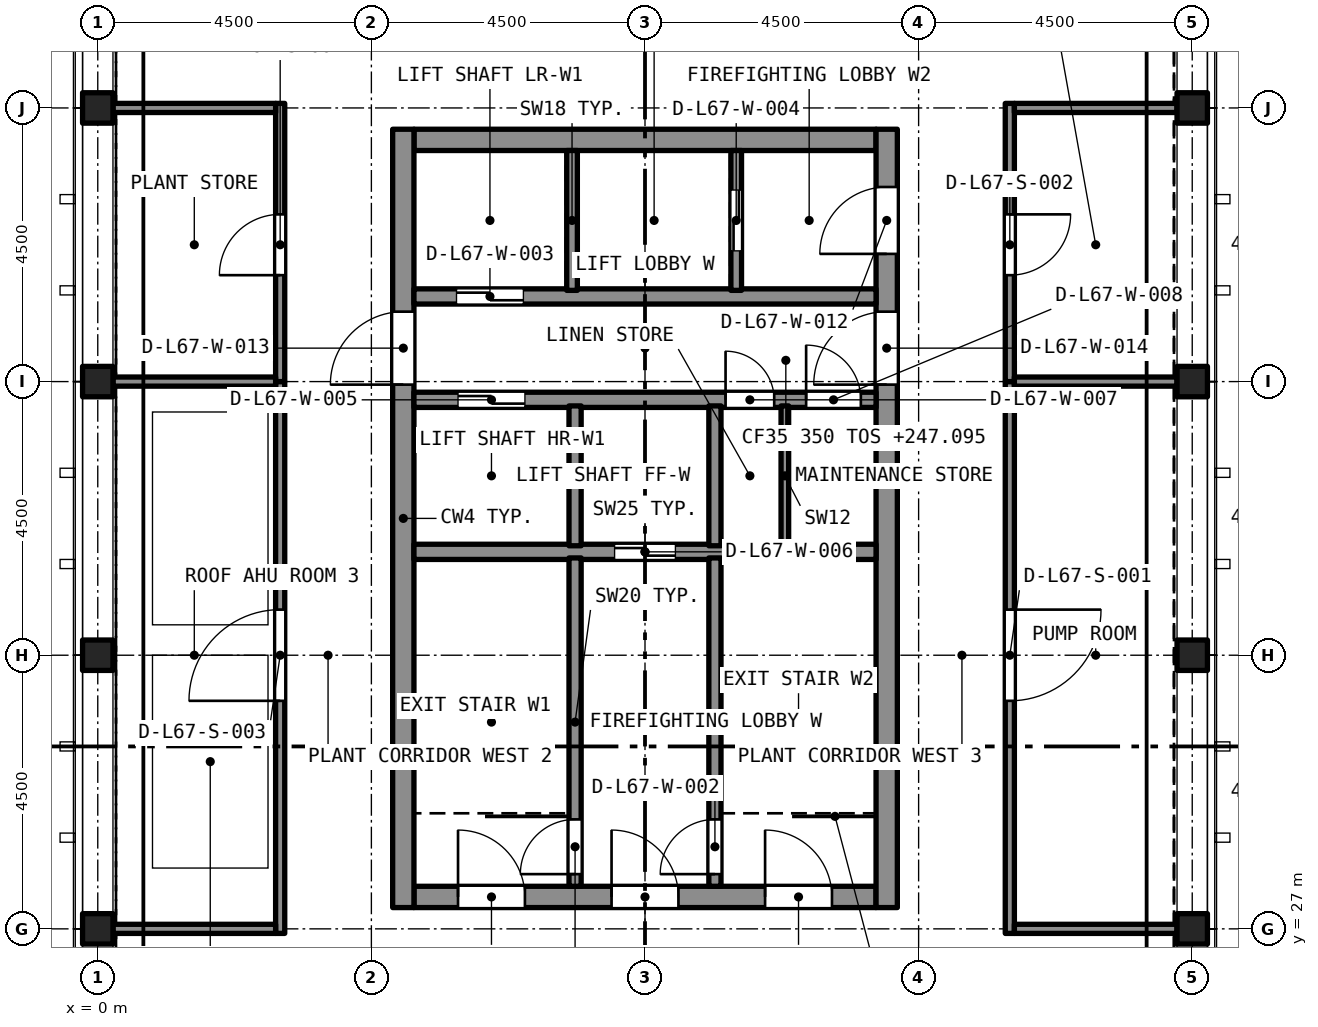
"""IFC4 building model, lengths in metres.
Left out: names, types, materials, properties, quantities, classifications, styles, units other than length and angle.
Written with IfcOpenShell. Run it as: python <this file> out.ifc"""

import sys

from ifc_helpers import new_model, si_unit, direction, frame, frame_2d, origin, origin_2d, place, context, subcontext, project, spatial, rectangle, hollow_rectangle, extrude, element, fill, save


model = new_model("IFC4")
c1 = context("Model", 3, precision=1e-05, world=origin(), true_north=direction((0.0, 1.0)))
c2 = subcontext(c1, "Body", "Model", "MODEL_VIEW")
j1 = project(units=[si_unit("LENGTHUNIT", "METRE"), si_unit("PLANEANGLEUNIT", "RADIAN")], contexts=[c1])
p1 = place(None, origin())
s1 = spatial("IfcSite", under=j1, at=p1, CompositionType="ELEMENT")
p2 = place(p1, origin())
s2 = spatial("IfcBuilding", under=s1, at=p2, CompositionType="ELEMENT")
p3 = place(p2, frame((0.0, 0.0, 247.095)))
s3 = spatial("IfcBuildingStorey", under=s2, at=p3, CompositionType="ELEMENT", Elevation=247.095)
p4 = place(p3, frame((5.2, 27.525, 0.0), z_axis=(0.0, 0.0, 1.0), x_axis=(1.0, 0.0, 0.0)))
e1 = element("IfcWall", 1, at=p4, inside=s3, PredefinedType="SOLIDWALL", context=c2, shape_type="SweptSolid", body=[
    extrude(rectangle(XDim=7.6, YDim=0.35, at=frame_2d((3.8, 0.0))), origin(), (0.0, 0.0, 1.0), 11.4),
])
p5 = place(p4, frame((0.725, 0.0, 0.0)))
e2 = element("IfcOpeningElement", 2, at=p5, cuts=e1, PredefinedType="OPENING", context=c2, shape_type="SweptSolid", body=[
    extrude(rectangle(XDim=1.1, YDim=2.1, at=frame_2d((0.55, 1.05))), frame((0.0, 0.185, 0.0), z_axis=(0.0, -1.0, 0.0), x_axis=(1.0, 0.0, 0.0)), (0.0, 0.0, 1.0), 0.37),
])
p6 = place(p4, frame((3.25, 0.0, 0.0)))
e3 = element("IfcOpeningElement", 3, at=p6, cuts=e1, PredefinedType="OPENING", context=c2, shape_type="SweptSolid", body=[
    extrude(rectangle(XDim=1.1, YDim=2.1, at=frame_2d((0.55, 1.05))), frame((0.0, 0.185, 0.0), z_axis=(0.0, -1.0, 0.0), x_axis=(1.0, 0.0, 0.0)), (0.0, 0.0, 1.0), 0.37),
])
p7 = place(p4, frame((5.775, 0.0, 0.0)))
e4 = element("IfcOpeningElement", 4, at=p7, cuts=e1, PredefinedType="OPENING", context=c2, shape_type="SweptSolid", body=[
    extrude(rectangle(XDim=1.1, YDim=2.1, at=frame_2d((0.55, 1.05))), frame((0.0, 0.185, 0.0), z_axis=(0.0, -1.0, 0.0), x_axis=(1.0, 0.0, 0.0)), (0.0, 0.0, 1.0), 0.37),
])
p8 = place(p3, frame((5.2, 39.975, 0.0), z_axis=(0.0, 0.0, 1.0), x_axis=(1.0, 0.0, 0.0)))
e5 = element("IfcWall", 5, at=p8, inside=s3, PredefinedType="SOLIDWALL", context=c2, shape_type="SweptSolid", body=[
    extrude(rectangle(XDim=7.6, YDim=0.35, at=frame_2d((3.8, 0.0))), origin(), (0.0, 0.0, 1.0), 11.4),
])
p9 = place(p3, frame((5.025, 27.35, 0.0), z_axis=(0.0, 0.0, 1.0), x_axis=(0.0, 1.0, 0.0)))
e6 = element("IfcWall", 6, at=p9, inside=s3, PredefinedType="SOLIDWALL", context=c2, shape_type="SweptSolid", body=[
    extrude(rectangle(XDim=12.8, YDim=0.35, at=frame_2d((6.4, 0.0))), origin(), (0.0, 0.0, 1.0), 11.4),
])
p10 = place(p9, frame((8.6, 0.0, 0.0)))
e7 = element("IfcOpeningElement", 7, at=p10, cuts=e6, PredefinedType="OPENING", context=c2, shape_type="SweptSolid", body=[
    extrude(rectangle(XDim=1.2, YDim=2.1, at=frame_2d((0.6, 1.05))), frame((0.0, 0.185, 0.0), z_axis=(0.0, -1.0, 0.0), x_axis=(1.0, 0.0, 0.0)), (0.0, 0.0, 1.0), 0.37),
])
p11 = place(p3, frame((12.975, 27.35, 0.0), z_axis=(0.0, 0.0, 1.0), x_axis=(0.0, 1.0, 0.0)))
e8 = element("IfcWall", 8, at=p11, inside=s3, PredefinedType="SOLIDWALL", context=c2, shape_type="SweptSolid", body=[
    extrude(rectangle(XDim=12.8, YDim=0.35, at=frame_2d((6.4, 0.0))), origin(), (0.0, 0.0, 1.0), 11.4),
])
p12 = place(p11, frame((10.75, 0.0, 0.0)))
e9 = element("IfcOpeningElement", 9, at=p12, cuts=e8, PredefinedType="OPENING", context=c2, shape_type="SweptSolid", body=[
    extrude(rectangle(XDim=1.1, YDim=2.1, at=frame_2d((0.55, 1.05))), frame((0.0, 0.185, 0.0), z_axis=(0.0, -1.0, 0.0), x_axis=(1.0, 0.0, 0.0)), (0.0, 0.0, 1.0), 0.37),
])
p13 = place(p11, frame((8.6, 0.0, 0.0)))
e10 = element("IfcOpeningElement", 10, at=p13, cuts=e8, PredefinedType="OPENING", context=c2, shape_type="SweptSolid", body=[
    extrude(rectangle(XDim=1.2, YDim=2.1, at=frame_2d((0.6, 1.05))), frame((0.0, 0.185, 0.0), z_axis=(0.0, -1.0, 0.0), x_axis=(1.0, 0.0, 0.0)), (0.0, 0.0, 1.0), 0.37),
])
for number, where, z_axis, x_axis in (
    (11, (0.0, 27.0, 0.0), (0.0, 0.0, 1.0), (1.0, 0.0, 0.0)),
    (12, (18.0, 27.0, 0.0), (0.0, 0.0, 1.0), (1.0, 0.0, 0.0)),
    (13, (0.0, 31.5, 0.0), (0.0, 0.0, 1.0), (1.0, 0.0, 0.0)),
    (14, (18.0, 31.5, 0.0), (0.0, 0.0, 1.0), (1.0, 0.0, 0.0)),
    (15, (0.0, 36.0, 0.0), (0.0, 0.0, 1.0), (1.0, 0.0, 0.0)),
    (16, (18.0, 36.0, 0.0), (0.0, 0.0, 1.0), (1.0, 0.0, 0.0)),
    (17, (0.0, 40.5, 0.0), (0.0, 0.0, 1.0), (1.0, 0.0, 0.0)),
    (18, (18.0, 40.5, 0.0), (0.0, 0.0, 1.0), (1.0, 0.0, 0.0)),
):
    element("IfcColumn", number, at=place(p3, frame(where, z_axis=z_axis, x_axis=x_axis)), inside=s3, PredefinedType="COLUMN", context=c2, shape_type="SweptSolid", body=[
        extrude(hollow_rectangle(XDim=0.5, YDim=0.5, WallThickness=0.025, at=origin_2d()), origin(), (0.0, 0.0, 1.0), 11.37),
    ])
p14 = place(p3, frame((5.2, 33.2, 0.0), z_axis=(0.0, 0.0, 1.0), x_axis=(1.0, 0.0, 0.0)))
e19 = element("IfcWall", 19, at=p14, inside=s3, PredefinedType="SOLIDWALL", context=c2, shape_type="SweptSolid", body=[
    extrude(rectangle(XDim=7.6, YDim=0.25, at=frame_2d((3.8, 0.0))), origin(), (0.0, 0.0, 1.0), 9.8),
])
p15 = place(p14, frame((3.3, 0.0, 0.0)))
e20 = element("IfcOpeningElement", 20, at=p15, cuts=e19, PredefinedType="OPENING", context=c2, shape_type="SweptSolid", body=[
    extrude(rectangle(XDim=1.0, YDim=2.1, at=frame_2d((0.5, 1.05))), frame((0.0, 0.135, 0.0), z_axis=(0.0, -1.0, 0.0), x_axis=(1.0, 0.0, 0.0)), (0.0, 0.0, 1.0), 0.27),
])
p16 = place(p3, frame((5.2, 35.7, 0.0), z_axis=(0.0, 0.0, 1.0), x_axis=(1.0, 0.0, 0.0)))
e21 = element("IfcWall", 21, at=p16, inside=s3, PredefinedType="SOLIDWALL", context=c2, shape_type="SweptSolid", body=[
    extrude(rectangle(XDim=7.6, YDim=0.25, at=frame_2d((3.8, 0.0))), origin(), (0.0, 0.0, 1.0), 9.8),
])
p17 = place(p16, frame((0.725, 0.0, 0.0)))
e22 = element("IfcOpeningElement", 22, at=p17, cuts=e21, PredefinedType="OPENING", context=c2, shape_type="SweptSolid", body=[
    extrude(rectangle(XDim=1.1, YDim=2.4, at=frame_2d((0.55, 1.2))), frame((0.0, 0.135, 0.0), z_axis=(0.0, -1.0, 0.0), x_axis=(1.0, 0.0, 0.0)), (0.0, 0.0, 1.0), 0.27),
])
p18 = place(p16, frame((5.125, 0.0, 0.0)))
e23 = element("IfcOpeningElement", 23, at=p18, cuts=e21, PredefinedType="OPENING", context=c2, shape_type="SweptSolid", body=[
    extrude(rectangle(XDim=0.8, YDim=2.1, at=frame_2d((0.4, 1.05))), frame((0.0, 0.135, 0.0), z_axis=(0.0, -1.0, 0.0), x_axis=(1.0, 0.0, 0.0)), (0.0, 0.0, 1.0), 0.27),
])
p19 = place(p16, frame((6.45, 0.0, 0.0)))
e24 = element("IfcOpeningElement", 24, at=p19, cuts=e21, PredefinedType="OPENING", context=c2, shape_type="SweptSolid", body=[
    extrude(rectangle(XDim=0.9, YDim=2.1, at=frame_2d((0.45, 1.05))), frame((0.0, 0.135, 0.0), z_axis=(0.0, -1.0, 0.0), x_axis=(1.0, 0.0, 0.0)), (0.0, 0.0, 1.0), 0.27),
])
p20 = place(p3, frame((5.2, 37.4, 0.0), z_axis=(0.0, 0.0, 1.0), x_axis=(1.0, 0.0, 0.0)))
e25 = element("IfcWall", 25, at=p20, inside=s3, PredefinedType="SOLIDWALL", context=c2, shape_type="SweptSolid", body=[
    extrude(rectangle(XDim=7.6, YDim=0.25, at=frame_2d((3.8, 0.0))), origin(), (0.0, 0.0, 1.0), 9.8),
])
p21 = place(p20, frame((0.7, 0.0, 0.0)))
e26 = element("IfcOpeningElement", 26, at=p21, cuts=e25, PredefinedType="OPENING", context=c2, shape_type="SweptSolid", body=[
    extrude(rectangle(XDim=1.1, YDim=2.4, at=frame_2d((0.55, 1.2))), frame((0.0, 0.135, 0.0), z_axis=(0.0, -1.0, 0.0), x_axis=(1.0, 0.0, 0.0)), (0.0, 0.0, 1.0), 0.27),
])
p22 = place(p3, frame((7.85, 27.7, 0.0), z_axis=(0.0, 0.0, 1.0), x_axis=(0.0, 1.0, 0.0)))
e27 = element("IfcWall", 27, at=p22, inside=s3, PredefinedType="SOLIDWALL", context=c2, shape_type="SweptSolid", body=[
    extrude(rectangle(XDim=5.4, YDim=0.2, at=frame_2d((2.7, 0.0))), origin(), (0.0, 0.0, 1.0), 9.8),
])
p23 = place(p22, frame((0.2, 0.0, 0.0)))
e28 = element("IfcOpeningElement", 28, at=p23, cuts=e27, PredefinedType="OPENING", context=c2, shape_type="SweptSolid", body=[
    extrude(rectangle(XDim=0.9, YDim=2.1, at=frame_2d((0.45, 1.05))), frame((0.0, 0.11, 0.0), z_axis=(0.0, -1.0, 0.0), x_axis=(1.0, 0.0, 0.0)), (0.0, 0.0, 1.0), 0.22),
])
p24 = place(p3, frame((10.15, 27.7, 0.0), z_axis=(0.0, 0.0, 1.0), x_axis=(0.0, 1.0, 0.0)))
e29 = element("IfcWall", 29, at=p24, inside=s3, PredefinedType="SOLIDWALL", context=c2, shape_type="SweptSolid", body=[
    extrude(rectangle(XDim=5.4, YDim=0.2, at=frame_2d((2.7, 0.0))), origin(), (0.0, 0.0, 1.0), 9.8),
])
p25 = place(p24, frame((0.2, 0.0, 0.0)))
e30 = element("IfcOpeningElement", 30, at=p25, cuts=e29, PredefinedType="OPENING", context=c2, shape_type="SweptSolid", body=[
    extrude(rectangle(XDim=0.9, YDim=2.1, at=frame_2d((0.45, 1.05))), frame((0.0, 0.11, 0.0), z_axis=(0.0, -1.0, 0.0), x_axis=(1.0, 0.0, 0.0)), (0.0, 0.0, 1.0), 0.22),
])
for number, where, z_axis, x_axis in (
    (31, (7.85, 33.3, 0.0), (0.0, 0.0, 1.0), (0.0, 1.0, 0.0)),
    (32, (10.15, 33.3, 0.0), (0.0, 0.0, 1.0), (0.0, 1.0, 0.0)),
):
    element("IfcWall", number, at=place(p3, frame(where, z_axis=z_axis, x_axis=x_axis)), inside=s3, PredefinedType="SOLIDWALL", context=c2, shape_type="SweptSolid", body=[
        extrude(rectangle(XDim=2.3, YDim=0.2, at=frame_2d((1.15, 0.0))), origin(), (0.0, 0.0, 1.0), 9.8),
    ])
p26 = place(p3, frame((7.8, 37.5, 0.0), z_axis=(0.0, 0.0, 1.0), x_axis=(0.0, 1.0, 0.0)))
e33 = element("IfcWall", 33, at=p26, inside=s3, PredefinedType="SOLIDWALL", context=c2, shape_type="SweptSolid", body=[
    extrude(rectangle(XDim=2.3, YDim=0.175, at=frame_2d((1.15, 0.0))), origin(), (0.0, 0.0, 1.0), 9.8),
])
p27 = place(p3, frame((10.5, 37.5, 0.0), z_axis=(0.0, 0.0, 1.0), x_axis=(0.0, 1.0, 0.0)))
e34 = element("IfcWall", 34, at=p27, inside=s3, PredefinedType="SOLIDWALL", context=c2, shape_type="SweptSolid", body=[
    extrude(rectangle(XDim=2.3, YDim=0.175, at=frame_2d((1.15, 0.0))), origin(), (0.0, 0.0, 1.0), 9.8),
])
p28 = place(p27, frame((0.65, 0.0, 0.0)))
e35 = element("IfcOpeningElement", 35, at=p28, cuts=e34, PredefinedType="OPENING", context=c2, shape_type="SweptSolid", body=[
    extrude(rectangle(XDim=1.0, YDim=2.1, at=frame_2d((0.5, 1.05))), frame((0.0, 0.097, 0.0), z_axis=(0.0, -1.0, 0.0), x_axis=(1.0, 0.0, 0.0)), (0.0, 0.0, 1.0), 0.195),
])
p29 = place(p3, frame((11.3, 33.3, 0.0), z_axis=(0.0, 0.0, 1.0), x_axis=(0.0, 1.0, 0.0)))
e36 = element("IfcWall", 36, at=p29, inside=s3, PredefinedType="PARTITIONING", context=c2, shape_type="SweptSolid", body=[
    extrude(rectangle(XDim=2.3, YDim=0.125, at=frame_2d((1.15, 0.0))), origin(), (0.0, 0.0, 1.0), 9.8),
])
p30 = place(p3, frame((15.0, 36.0, 0.0), z_axis=(0.0, 0.0, 1.0), x_axis=(0.0, -1.0, 0.0)))
e37 = element("IfcWall", 37, at=p30, inside=s3, PredefinedType="PARTITIONING", context=c2, shape_type="SweptSolid", body=[
    extrude(rectangle(XDim=9.075, YDim=0.15, at=frame_2d((4.538, 0.0))), origin(), (0.0, 0.0, 1.0), 9.8),
])
p31 = place(p30, frame((3.75, 0.0, 0.0)))
e38 = element("IfcOpeningElement", 38, at=p31, cuts=e37, PredefinedType="OPENING", context=c2, shape_type="SweptSolid", body=[
    extrude(rectangle(XDim=1.5, YDim=2.4, at=frame_2d((0.75, 1.2))), frame((0.0, 0.085, 0.0), z_axis=(0.0, -1.0, 0.0), x_axis=(1.0, 0.0, 0.0)), (0.0, 0.0, 1.0), 0.17),
])
p32 = place(p3, frame((15.0, 40.575, 0.0), z_axis=(0.0, 0.0, 1.0), x_axis=(0.0, -1.0, 0.0)))
e39 = element("IfcWall", 39, at=p32, inside=s3, PredefinedType="PARTITIONING", context=c2, shape_type="SweptSolid", body=[
    extrude(rectangle(XDim=4.575, YDim=0.15, at=frame_2d((2.288, 0.0))), origin(), (0.0, 0.0, 1.0), 9.8),
])
p33 = place(p32, frame((1.825, 0.0, 0.0)))
e40 = element("IfcOpeningElement", 40, at=p33, cuts=e39, PredefinedType="OPENING", context=c2, shape_type="SweptSolid", body=[
    extrude(rectangle(XDim=1.0, YDim=2.1, at=frame_2d((0.5, 1.05))), frame((0.0, 0.085, 0.0), z_axis=(0.0, -1.0, 0.0), x_axis=(1.0, 0.0, 0.0)), (0.0, 0.0, 1.0), 0.17),
])
p34 = place(p3, frame((3.0, 26.925, 0.0), z_axis=(0.0, 0.0, 1.0), x_axis=(0.0, 1.0, 0.0)))
e41 = element("IfcWall", 41, at=p34, inside=s3, PredefinedType="PARTITIONING", context=c2, shape_type="SweptSolid", body=[
    extrude(rectangle(XDim=9.075, YDim=0.15, at=frame_2d((4.538, 0.0))), origin(), (0.0, 0.0, 1.0), 9.8),
])
p35 = place(p34, frame((3.825, 0.0, 0.0)))
e42 = element("IfcOpeningElement", 42, at=p35, cuts=e41, PredefinedType="OPENING", context=c2, shape_type="SweptSolid", body=[
    extrude(rectangle(XDim=1.5, YDim=2.4, at=frame_2d((0.75, 1.2))), frame((0.0, 0.085, 0.0), z_axis=(0.0, -1.0, 0.0), x_axis=(1.0, 0.0, 0.0)), (0.0, 0.0, 1.0), 0.17),
])
p36 = place(p3, frame((3.0, 36.0, 0.0), z_axis=(0.0, 0.0, 1.0), x_axis=(0.0, 1.0, 0.0)))
e43 = element("IfcWall", 43, at=p36, inside=s3, PredefinedType="PARTITIONING", context=c2, shape_type="SweptSolid", body=[
    extrude(rectangle(XDim=4.575, YDim=0.15, at=frame_2d((2.288, 0.0))), origin(), (0.0, 0.0, 1.0), 9.8),
])
p37 = place(p36, frame((1.75, 0.0, 0.0)))
e44 = element("IfcOpeningElement", 44, at=p37, cuts=e43, PredefinedType="OPENING", context=c2, shape_type="SweptSolid", body=[
    extrude(rectangle(XDim=1.0, YDim=2.1, at=frame_2d((0.5, 1.05))), frame((0.0, 0.085, 0.0), z_axis=(0.0, -1.0, 0.0), x_axis=(1.0, 0.0, 0.0)), (0.0, 0.0, 1.0), 0.17),
])
for number, where, z_axis, x_axis in (
    (45, (15.075, 27.0, 0.0), (0.0, 0.0, 1.0), (1.0, 0.0, 0.0)),
    (46, (0.25, 27.0, 0.0), (0.0, 0.0, 1.0), (1.0, 0.0, 0.0)),
    (47, (15.075, 40.5, 0.0), (0.0, 0.0, 1.0), (1.0, 0.0, 0.0)),
    (48, (0.25, 40.5, 0.0), (0.0, 0.0, 1.0), (1.0, 0.0, 0.0)),
    (49, (15.075, 36.0, 0.0), (0.0, 0.0, 1.0), (1.0, 0.0, 0.0)),
    (50, (0.25, 36.0, 0.0), (0.0, 0.0, 1.0), (1.0, 0.0, 0.0)),
):
    element("IfcWall", number, at=place(p3, frame(where, z_axis=z_axis, x_axis=x_axis)), inside=s3, PredefinedType="PARTITIONING", context=c2, shape_type="SweptSolid", body=[
        extrude(rectangle(XDim=2.675, YDim=0.15, at=frame_2d((1.337, 0.0))), origin(), (0.0, 0.0, 1.0), 9.8),
    ])
p38 = place(p23, origin())
e51 = element("IfcDoor", 51, at=p38, inside=s3, OperationType="SINGLE_SWING_LEFT", PredefinedType="DOOR", context=c2, shape_type="SweptSolid", body=[
    extrude(rectangle(XDim=0.9, YDim=2.1, at=frame_2d((0.45, 1.05))), frame((0.0, 0.025, 0.0), z_axis=(0.0, -1.0, 0.0), x_axis=(1.0, 0.0, 0.0)), (0.0, 0.0, 1.0), 0.05),
])
fill(e28, e51)
p39 = place(p25, origin())
e52 = element("IfcDoor", 52, at=p39, inside=s3, OperationType="SINGLE_SWING_LEFT", PredefinedType="DOOR", context=c2, shape_type="SweptSolid", body=[
    extrude(rectangle(XDim=0.9, YDim=2.1, at=frame_2d((0.45, 1.05))), frame((0.0, 0.025, 0.0), z_axis=(0.0, -1.0, 0.0), x_axis=(1.0, 0.0, 0.0)), (0.0, 0.0, 1.0), 0.05),
])
fill(e30, e52)
p40 = place(p21, origin())
e53 = element("IfcDoor", 53, at=p40, inside=s3, OperationType="SLIDING_TO_LEFT", PredefinedType="DOOR", context=c2, shape_type="SweptSolid", body=[
    extrude(rectangle(XDim=1.1, YDim=2.4, at=frame_2d((0.55, 1.2))), frame((0.0, 0.025, 0.0), z_axis=(0.0, -1.0, 0.0), x_axis=(1.0, 0.0, 0.0)), (0.0, 0.0, 1.0), 0.05),
])
fill(e26, e53)
p41 = place(p28, origin())
e54 = element("IfcDoor", 54, at=p41, inside=s3, OperationType="SLIDING_TO_LEFT", PredefinedType="DOOR", context=c2, shape_type="SweptSolid", body=[
    extrude(rectangle(XDim=1.0, YDim=2.1, at=frame_2d((0.5, 1.05))), frame((0.0, 0.025, 0.0), z_axis=(0.0, -1.0, 0.0), x_axis=(1.0, 0.0, 0.0)), (0.0, 0.0, 1.0), 0.05),
])
fill(e35, e54)
p42 = place(p17, origin())
e55 = element("IfcDoor", 55, at=p42, inside=s3, OperationType="SLIDING_TO_LEFT", PredefinedType="DOOR", context=c2, shape_type="SweptSolid", body=[
    extrude(rectangle(XDim=1.1, YDim=2.4, at=frame_2d((0.55, 1.2))), frame((0.0, 0.025, 0.0), z_axis=(0.0, -1.0, 0.0), x_axis=(1.0, 0.0, 0.0)), (0.0, 0.0, 1.0), 0.05),
])
fill(e22, e55)
p43 = place(p15, origin())
e56 = element("IfcDoor", 56, at=p43, inside=s3, OperationType="SLIDING_TO_LEFT", PredefinedType="DOOR", context=c2, shape_type="SweptSolid", body=[
    extrude(rectangle(XDim=1.0, YDim=2.1, at=frame_2d((0.5, 1.05))), frame((0.0, 0.025, 0.0), z_axis=(0.0, -1.0, 0.0), x_axis=(1.0, 0.0, 0.0)), (0.0, 0.0, 1.0), 0.05),
])
fill(e20, e56)
p44 = place(p18, origin())
e57 = element("IfcDoor", 57, at=p44, inside=s3, OperationType="SINGLE_SWING_LEFT", PredefinedType="DOOR", context=c2, shape_type="SweptSolid", body=[
    extrude(rectangle(XDim=0.8, YDim=2.1, at=frame_2d((0.4, 1.05))), frame((0.0, 0.025, 0.0), z_axis=(0.0, -1.0, 0.0), x_axis=(1.0, 0.0, 0.0)), (0.0, 0.0, 1.0), 0.05),
])
fill(e23, e57)
p45 = place(p19, origin())
e58 = element("IfcDoor", 58, at=p45, inside=s3, OperationType="SINGLE_SWING_LEFT", PredefinedType="DOOR", context=c2, shape_type="SweptSolid", body=[
    extrude(rectangle(XDim=0.9, YDim=2.1, at=frame_2d((0.45, 1.05))), frame((0.0, 0.025, 0.0), z_axis=(0.0, -1.0, 0.0), x_axis=(1.0, 0.0, 0.0)), (0.0, 0.0, 1.0), 0.05),
])
fill(e24, e58)
p46 = place(p5, origin())
e59 = element("IfcDoor", 59, at=p46, inside=s3, OperationType="SINGLE_SWING_LEFT", PredefinedType="DOOR", context=c2, shape_type="SweptSolid", body=[
    extrude(rectangle(XDim=1.1, YDim=2.1, at=frame_2d((0.55, 1.05))), frame((0.0, 0.025, 0.0), z_axis=(0.0, -1.0, 0.0), x_axis=(1.0, 0.0, 0.0)), (0.0, 0.0, 1.0), 0.05),
])
fill(e2, e59)
p47 = place(p6, origin())
e60 = element("IfcDoor", 60, at=p47, inside=s3, OperationType="SINGLE_SWING_LEFT", PredefinedType="DOOR", context=c2, shape_type="SweptSolid", body=[
    extrude(rectangle(XDim=1.1, YDim=2.1, at=frame_2d((0.55, 1.05))), frame((0.0, 0.025, 0.0), z_axis=(0.0, -1.0, 0.0), x_axis=(1.0, 0.0, 0.0)), (0.0, 0.0, 1.0), 0.05),
])
fill(e3, e60)
p48 = place(p7, origin())
e61 = element("IfcDoor", 61, at=p48, inside=s3, OperationType="SINGLE_SWING_LEFT", PredefinedType="DOOR", context=c2, shape_type="SweptSolid", body=[
    extrude(rectangle(XDim=1.1, YDim=2.1, at=frame_2d((0.55, 1.05))), frame((0.0, 0.025, 0.0), z_axis=(0.0, -1.0, 0.0), x_axis=(1.0, 0.0, 0.0)), (0.0, 0.0, 1.0), 0.05),
])
fill(e4, e61)
p49 = place(p12, origin())
e62 = element("IfcDoor", 62, at=p49, inside=s3, OperationType="SINGLE_SWING_LEFT", PredefinedType="DOOR", context=c2, shape_type="SweptSolid", body=[
    extrude(rectangle(XDim=1.1, YDim=2.1, at=frame_2d((0.55, 1.05))), frame((0.0, 0.025, 0.0), z_axis=(0.0, -1.0, 0.0), x_axis=(1.0, 0.0, 0.0)), (0.0, 0.0, 1.0), 0.05),
])
fill(e9, e62)
p50 = place(p10, origin())
e63 = element("IfcDoor", 63, at=p50, inside=s3, OperationType="SINGLE_SWING_LEFT", PredefinedType="DOOR", context=c2, shape_type="SweptSolid", body=[
    extrude(rectangle(XDim=1.2, YDim=2.1, at=frame_2d((0.6, 1.05))), frame((0.0, 0.025, 0.0), z_axis=(0.0, -1.0, 0.0), x_axis=(1.0, 0.0, 0.0)), (0.0, 0.0, 1.0), 0.05),
])
fill(e7, e63)
p51 = place(p13, origin())
e64 = element("IfcDoor", 64, at=p51, inside=s3, OperationType="SINGLE_SWING_LEFT", PredefinedType="DOOR", context=c2, shape_type="SweptSolid", body=[
    extrude(rectangle(XDim=1.2, YDim=2.1, at=frame_2d((0.6, 1.05))), frame((0.0, 0.025, 0.0), z_axis=(0.0, -1.0, 0.0), x_axis=(1.0, 0.0, 0.0)), (0.0, 0.0, 1.0), 0.05),
])
fill(e10, e64)
p52 = place(p31, origin())
e65 = element("IfcDoor", 65, at=p52, inside=s3, OperationType="DOUBLE_DOOR_SINGLE_SWING", PredefinedType="DOOR", context=c2, shape_type="SweptSolid", body=[
    extrude(rectangle(XDim=1.5, YDim=2.4, at=frame_2d((0.75, 1.2))), frame((0.0, 0.025, 0.0), z_axis=(0.0, -1.0, 0.0), x_axis=(1.0, 0.0, 0.0)), (0.0, 0.0, 1.0), 0.05),
])
fill(e38, e65)
p53 = place(p33, origin())
e66 = element("IfcDoor", 66, at=p53, inside=s3, OperationType="SINGLE_SWING_RIGHT", PredefinedType="DOOR", context=c2, shape_type="SweptSolid", body=[
    extrude(rectangle(XDim=1.0, YDim=2.1, at=frame_2d((0.5, 1.05))), frame((0.0, 0.025, 0.0), z_axis=(0.0, -1.0, 0.0), x_axis=(1.0, 0.0, 0.0)), (0.0, 0.0, 1.0), 0.05),
])
fill(e40, e66)
p54 = place(p35, origin())
e67 = element("IfcDoor", 67, at=p54, inside=s3, OperationType="DOUBLE_DOOR_SINGLE_SWING", PredefinedType="DOOR", context=c2, shape_type="SweptSolid", body=[
    extrude(rectangle(XDim=1.5, YDim=2.4, at=frame_2d((0.75, 1.2))), frame((0.0, 0.025, 0.0), z_axis=(0.0, -1.0, 0.0), x_axis=(1.0, 0.0, 0.0)), (0.0, 0.0, 1.0), 0.05),
])
fill(e42, e67)
p55 = place(p37, origin())
e68 = element("IfcDoor", 68, at=p55, inside=s3, OperationType="SINGLE_SWING_LEFT", PredefinedType="DOOR", context=c2, shape_type="SweptSolid", body=[
    extrude(rectangle(XDim=1.0, YDim=2.1, at=frame_2d((0.5, 1.05))), frame((0.0, 0.025, 0.0), z_axis=(0.0, -1.0, 0.0), x_axis=(1.0, 0.0, 0.0)), (0.0, 0.0, 1.0), 0.05),
])
fill(e44, e68)
save(model, sys.argv[1])
